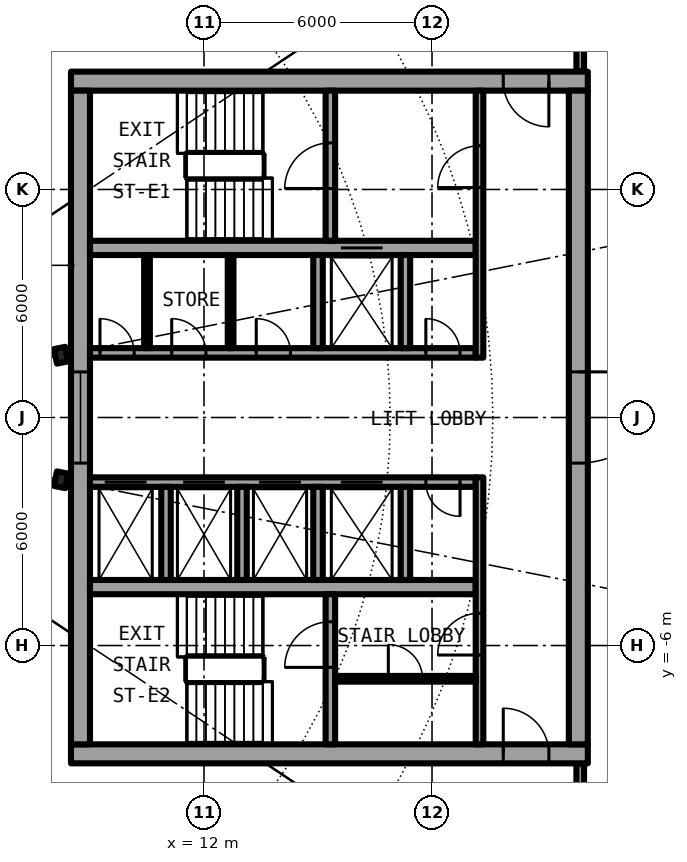
"""IFC4 building model, lengths in metres.
Left out: names, types, materials, properties, quantities, classifications, styles, units other than length and angle.
Written with IfcOpenShell. Run it as: python <this file> out.ifc"""

import sys

from ifc_helpers import new_model, si_unit, direction, frame, frame_2d, origin, origin_2d, place, context, subcontext, project, spatial, rectangle, i_section, extrude, element, fill, save


model = new_model("IFC4")
c1 = context("Model", 3, precision=1e-05, world=origin(), true_north=direction((0.0, 1.0)))
c2 = subcontext(c1, "Body", "Model", "MODEL_VIEW")
j1 = project(units=[si_unit("LENGTHUNIT", "METRE"), si_unit("PLANEANGLEUNIT", "RADIAN")], contexts=[c1])
p1 = place(None, origin())
s1 = spatial("IfcSite", under=j1, at=p1, CompositionType="ELEMENT")
p2 = place(p1, origin())
s2 = spatial("IfcBuilding", under=s1, at=p2, CompositionType="ELEMENT")
p3 = place(p2, frame((0.0, 0.0, 179.9)))
s3 = spatial("IfcBuildingStorey", under=s2, at=p3, CompositionType="ELEMENT", Elevation=179.9)
for number, where, z_axis, x_axis in (
    (1, (8.239, 1.639, 0.0), (0.0, 0.0, 1.0), (0.981, 0.195, 0.0)),
    (2, (8.239, -1.639, 0.0), (0.0, 0.0, 1.0), (0.981, -0.195, 0.0)),
):
    element("IfcColumn", number, at=place(p3, frame(where, z_axis=z_axis, x_axis=x_axis)), inside=s3, PredefinedType="COLUMN", context=c2, shape_type="SweptSolid", body=[
        extrude(i_section(OverallWidth=0.3, OverallDepth=0.39, WebThickness=0.011, FlangeThickness=0.019, FilletRadius=0.027, at=origin_2d()), origin(), (0.0, 0.0, 1.0), 6.1),
    ])
p4 = place(p3, frame((22.1, 8.85, 0.0), z_axis=(0.0, 0.0, 1.0), x_axis=(-1.0, 0.0, 0.0)))
e3 = element("IfcWall", 3, at=p4, inside=s3, PredefinedType="SHEAR", context=c2, shape_type="SweptSolid", body=[
    extrude(rectangle(XDim=13.6, YDim=0.5, at=frame_2d((6.8, 0.0))), origin(), (0.0, 0.0, 1.0), 6.1),
])
p5 = place(p4, frame((1.025, 0.0, 0.0)))
e4 = element("IfcOpeningElement", 4, at=p5, cuts=e3, PredefinedType="OPENING", context=c2, shape_type="SweptSolid", body=[
    extrude(rectangle(XDim=1.2, YDim=2.3, at=frame_2d((0.6, 1.15))), frame((0.0, 0.26, 0.0), z_axis=(0.0, -1.0, 0.0), x_axis=(1.0, 0.0, 0.0)), (0.0, 0.0, 1.0), 0.52),
])
p6 = place(p3, frame((8.5, -8.85, 0.0), z_axis=(0.0, 0.0, 1.0), x_axis=(1.0, 0.0, 0.0)))
e5 = element("IfcWall", 5, at=p6, inside=s3, PredefinedType="SHEAR", context=c2, shape_type="SweptSolid", body=[
    extrude(rectangle(XDim=13.6, YDim=0.5, at=frame_2d((6.8, 0.0))), origin(), (0.0, 0.0, 1.0), 6.1),
])
p7 = place(p6, frame((11.375, 0.0, 0.0)))
e6 = element("IfcOpeningElement", 6, at=p7, cuts=e5, PredefinedType="OPENING", context=c2, shape_type="SweptSolid", body=[
    extrude(rectangle(XDim=1.2, YDim=2.3, at=frame_2d((0.6, 1.15))), frame((0.0, 0.26, 0.0), z_axis=(0.0, -1.0, 0.0), x_axis=(1.0, 0.0, 0.0)), (0.0, 0.0, 1.0), 0.52),
])
p8 = place(p3, frame((21.85, 8.6, 0.0), z_axis=(0.0, 0.0, 1.0), x_axis=(0.0, -1.0, 0.0)))
e7 = element("IfcWall", 7, at=p8, inside=s3, PredefinedType="SHEAR", context=c2, shape_type="SweptSolid", body=[
    extrude(rectangle(XDim=17.2, YDim=0.5, at=frame_2d((8.6, 0.0))), origin(), (0.0, 0.0, 1.0), 6.1),
])
p9 = place(p8, frame((7.4, 0.0, 0.0)))
e8 = element("IfcOpeningElement", 8, at=p9, cuts=e7, PredefinedType="OPENING", context=c2, shape_type="SweptSolid", body=[
    extrude(rectangle(XDim=2.4, YDim=2.3, at=frame_2d((1.2, 1.15))), frame((0.0, 0.26, 0.0), z_axis=(0.0, -1.0, 0.0), x_axis=(1.0, 0.0, 0.0)), (0.0, 0.0, 1.0), 0.52),
])
p10 = place(p3, frame((8.75, -8.6, 0.0), z_axis=(0.0, 0.0, 1.0), x_axis=(0.0, 1.0, 0.0)))
e9 = element("IfcWall", 9, at=p10, inside=s3, PredefinedType="SHEAR", context=c2, shape_type="SweptSolid", body=[
    extrude(rectangle(XDim=17.2, YDim=0.5, at=frame_2d((8.6, 0.0))), origin(), (0.0, 0.0, 1.0), 6.1),
])
p11 = place(p10, frame((7.4, 0.0, 0.1)))
e10 = element("IfcOpeningElement", 10, at=p11, cuts=e9, PredefinedType="OPENING", context=c2, shape_type="SweptSolid", body=[
    extrude(rectangle(XDim=2.4, YDim=2.2, at=frame_2d((1.2, 1.1))), frame((0.0, 0.26, 0.0), z_axis=(0.0, -1.0, 0.0), x_axis=(1.0, 0.0, 0.0)), (0.0, 0.0, 1.0), 0.52),
])
p12 = place(p3, frame((9.0, 1.7, 0.0), z_axis=(0.0, 0.0, 1.0), x_axis=(1.0, 0.0, 0.0)))
e11 = element("IfcWall", 11, at=p12, inside=s3, PredefinedType="SHEAR", context=c2, shape_type="SweptSolid", body=[
    extrude(rectangle(XDim=10.15, YDim=0.25, at=frame_2d((5.075, 0.0))), origin(), (0.0, 0.0, 1.0), 6.1),
])
p13 = place(p12, frame((0.262, 0.0, 0.0)))
e12 = element("IfcOpeningElement", 12, at=p13, cuts=e11, PredefinedType="OPENING", context=c2, shape_type="SweptSolid", body=[
    extrude(rectangle(XDim=0.9, YDim=2.3, at=frame_2d((0.45, 1.15))), frame((0.0, 0.135, 0.0), z_axis=(0.0, -1.0, 0.0), x_axis=(1.0, 0.0, 0.0)), (0.0, 0.0, 1.0), 0.27),
])
p14 = place(p12, frame((2.15, 0.0, 0.0)))
e13 = element("IfcOpeningElement", 13, at=p14, cuts=e11, PredefinedType="OPENING", context=c2, shape_type="SweptSolid", body=[
    extrude(rectangle(XDim=0.9, YDim=2.3, at=frame_2d((0.45, 1.15))), frame((0.0, 0.135, 0.0), z_axis=(0.0, -1.0, 0.0), x_axis=(1.0, 0.0, 0.0)), (0.0, 0.0, 1.0), 0.27),
])
p15 = place(p12, frame((4.375, 0.0, 0.0)))
e14 = element("IfcOpeningElement", 14, at=p15, cuts=e11, PredefinedType="OPENING", context=c2, shape_type="SweptSolid", body=[
    extrude(rectangle(XDim=0.9, YDim=2.3, at=frame_2d((0.45, 1.15))), frame((0.0, 0.135, 0.0), z_axis=(0.0, -1.0, 0.0), x_axis=(1.0, 0.0, 0.0)), (0.0, 0.0, 1.0), 0.27),
])
p16 = place(p12, frame((8.837, 0.0, 0.0)))
e15 = element("IfcOpeningElement", 15, at=p16, cuts=e11, PredefinedType="OPENING", context=c2, shape_type="SweptSolid", body=[
    extrude(rectangle(XDim=0.9, YDim=2.3, at=frame_2d((0.45, 1.15))), frame((0.0, 0.135, 0.0), z_axis=(0.0, -1.0, 0.0), x_axis=(1.0, 0.0, 0.0)), (0.0, 0.0, 1.0), 0.27),
])
p17 = place(p3, frame((9.0, 4.462, 0.0), z_axis=(0.0, 0.0, 1.0), x_axis=(1.0, 0.0, 0.0)))
e16 = element("IfcWall", 16, at=p17, inside=s3, PredefinedType="SHEAR", context=c2, shape_type="SweptSolid", body=[
    extrude(rectangle(XDim=10.15, YDim=0.375, at=frame_2d((5.075, 0.0))), origin(), (0.0, 0.0, 1.0), 6.1),
])
p18 = place(p17, frame((6.6, 0.0, 0.0)))
e17 = element("IfcOpeningElement", 17, at=p18, cuts=e16, PredefinedType="OPENING", context=c2, shape_type="SweptSolid", body=[
    extrude(rectangle(XDim=1.1, YDim=2.3, at=frame_2d((0.55, 1.15))), frame((0.0, 0.198, 0.0), z_axis=(0.0, -1.0, 0.0), x_axis=(1.0, 0.0, 0.0)), (0.0, 0.0, 1.0), 0.395),
])
p19 = place(p3, frame((15.325, 4.65, 0.0), z_axis=(0.0, 0.0, 1.0), x_axis=(0.0, 1.0, 0.0)))
e18 = element("IfcWall", 18, at=p19, inside=s3, PredefinedType="SHEAR", context=c2, shape_type="SweptSolid", body=[
    extrude(rectangle(XDim=3.95, YDim=0.25, at=frame_2d((1.975, 0.0))), origin(), (0.0, 0.0, 1.0), 6.1),
])
p20 = place(p19, frame((1.375, 0.0, 0.0)))
e19 = element("IfcOpeningElement", 19, at=p20, cuts=e18, PredefinedType="OPENING", context=c2, shape_type="SweptSolid", body=[
    extrude(rectangle(XDim=1.2, YDim=2.3, at=frame_2d((0.6, 1.15))), frame((0.0, 0.135, 0.0), z_axis=(0.0, -1.0, 0.0), x_axis=(1.0, 0.0, 0.0)), (0.0, 0.0, 1.0), 0.27),
])
for number, where, z_axis, x_axis in (
    (20, (15.0, 1.825, 0.0), (0.0, 0.0, 1.0), (0.0, 1.0, 0.0)),
    (21, (17.3, 1.825, 0.0), (0.0, 0.0, 1.0), (0.0, 1.0, 0.0)),
):
    element("IfcWall", number, at=place(p3, frame(where, z_axis=z_axis, x_axis=x_axis)), inside=s3, PredefinedType="SOLIDWALL", context=c2, shape_type="SweptSolid", body=[
        extrude(rectangle(XDim=2.45, YDim=0.25, at=frame_2d((1.225, 0.0))), origin(), (0.0, 0.0, 1.0), 5.7),
    ])
p21 = place(p3, frame((19.25, 1.575, 0.0), z_axis=(0.0, 0.0, 1.0), x_axis=(0.0, 1.0, 0.0)))
e22 = element("IfcWall", 22, at=p21, inside=s3, PredefinedType="SOLIDWALL", context=c2, shape_type="SweptSolid", body=[
    extrude(rectangle(XDim=7.025, YDim=0.2, at=frame_2d((3.513, 0.0))), origin(), (0.0, 0.0, 1.0), 5.7),
])
p22 = place(p21, frame((4.475, 0.0, 0.0)))
e23 = element("IfcOpeningElement", 23, at=p22, cuts=e22, PredefinedType="OPENING", context=c2, shape_type="SweptSolid", body=[
    extrude(rectangle(XDim=1.1, YDim=2.3, at=frame_2d((0.55, 1.15))), frame((0.0, 0.11, 0.0), z_axis=(0.0, -1.0, 0.0), x_axis=(1.0, 0.0, 0.0)), (0.0, 0.0, 1.0), 0.22),
])
p23 = place(p3, frame((19.15, -1.7, 0.0), z_axis=(0.0, 0.0, 1.0), x_axis=(-1.0, 0.0, 0.0)))
e24 = element("IfcWall", 24, at=p23, inside=s3, PredefinedType="SHEAR", context=c2, shape_type="SweptSolid", body=[
    extrude(rectangle(XDim=10.15, YDim=0.25, at=frame_2d((5.075, 0.0))), origin(), (0.0, 0.0, 1.0), 6.1),
])
p24 = place(p23, frame((8.663, 0.0, 0.0)))
e25 = element("IfcOpeningElement", 25, at=p24, cuts=e24, PredefinedType="OPENING", context=c2, shape_type="SweptSolid", body=[
    extrude(rectangle(XDim=1.1, YDim=2.3, at=frame_2d((0.55, 1.15))), frame((0.0, 0.135, 0.0), z_axis=(0.0, -1.0, 0.0), x_axis=(1.0, 0.0, 0.0)), (0.0, 0.0, 1.0), 0.27),
])
p25 = place(p23, frame((6.6, 0.0, 0.0)))
e26 = element("IfcOpeningElement", 26, at=p25, cuts=e24, PredefinedType="OPENING", context=c2, shape_type="SweptSolid", body=[
    extrude(rectangle(XDim=1.1, YDim=2.3, at=frame_2d((0.55, 1.15))), frame((0.0, 0.135, 0.0), z_axis=(0.0, -1.0, 0.0), x_axis=(1.0, 0.0, 0.0)), (0.0, 0.0, 1.0), 0.27),
])
p26 = place(p23, frame((4.6, 0.0, 0.0)))
e27 = element("IfcOpeningElement", 27, at=p26, cuts=e24, PredefinedType="OPENING", context=c2, shape_type="SweptSolid", body=[
    extrude(rectangle(XDim=1.1, YDim=2.3, at=frame_2d((0.55, 1.15))), frame((0.0, 0.135, 0.0), z_axis=(0.0, -1.0, 0.0), x_axis=(1.0, 0.0, 0.0)), (0.0, 0.0, 1.0), 0.27),
])
p27 = place(p23, frame((2.45, 0.0, 0.0)))
e28 = element("IfcOpeningElement", 28, at=p27, cuts=e24, PredefinedType="OPENING", context=c2, shape_type="SweptSolid", body=[
    extrude(rectangle(XDim=1.1, YDim=2.3, at=frame_2d((0.55, 1.15))), frame((0.0, 0.135, 0.0), z_axis=(0.0, -1.0, 0.0), x_axis=(1.0, 0.0, 0.0)), (0.0, 0.0, 1.0), 0.27),
])
p28 = place(p23, frame((0.413, 0.0, 0.0)))
e29 = element("IfcOpeningElement", 29, at=p28, cuts=e24, PredefinedType="OPENING", context=c2, shape_type="SweptSolid", body=[
    extrude(rectangle(XDim=0.9, YDim=2.3, at=frame_2d((0.45, 1.15))), frame((0.0, 0.135, 0.0), z_axis=(0.0, -1.0, 0.0), x_axis=(1.0, 0.0, 0.0)), (0.0, 0.0, 1.0), 0.27),
])
p29 = place(p3, frame((9.0, -4.462, 0.0), z_axis=(0.0, 0.0, 1.0), x_axis=(1.0, 0.0, 0.0)))
e30 = element("IfcWall", 30, at=p29, inside=s3, PredefinedType="SHEAR", context=c2, shape_type="SweptSolid", body=[
    extrude(rectangle(XDim=10.15, YDim=0.375, at=frame_2d((5.075, 0.0))), origin(), (0.0, 0.0, 1.0), 6.1),
])
p30 = place(p3, frame((15.325, -8.6, 0.0), z_axis=(0.0, 0.0, 1.0), x_axis=(0.0, 1.0, 0.0)))
e31 = element("IfcWall", 31, at=p30, inside=s3, PredefinedType="SHEAR", context=c2, shape_type="SweptSolid", body=[
    extrude(rectangle(XDim=3.95, YDim=0.25, at=frame_2d((1.975, 0.0))), origin(), (0.0, 0.0, 1.0), 6.1),
])
p31 = place(p30, frame((2.025, 0.0, 0.0)))
e32 = element("IfcOpeningElement", 32, at=p31, cuts=e31, PredefinedType="OPENING", context=c2, shape_type="SweptSolid", body=[
    extrude(rectangle(XDim=1.2, YDim=2.3, at=frame_2d((0.6, 1.15))), frame((0.0, 0.135, 0.0), z_axis=(0.0, -1.0, 0.0), x_axis=(1.0, 0.0, 0.0)), (0.0, 0.0, 1.0), 0.27),
])
for number, where, z_axis, x_axis in (
    (33, (15.0, -1.825, 0.0), (0.0, 0.0, 1.0), (0.0, -1.0, 0.0)),
    (34, (17.3, -1.825, 0.0), (0.0, 0.0, 1.0), (0.0, -1.0, 0.0)),
):
    element("IfcWall", number, at=place(p3, frame(where, z_axis=z_axis, x_axis=x_axis)), inside=s3, PredefinedType="SOLIDWALL", context=c2, shape_type="SweptSolid", body=[
        extrude(rectangle(XDim=2.45, YDim=0.25, at=frame_2d((1.225, 0.0))), origin(), (0.0, 0.0, 1.0), 5.7),
    ])
p32 = place(p3, frame((19.25, -8.6, 0.0), z_axis=(0.0, 0.0, 1.0), x_axis=(0.0, 1.0, 0.0)))
e35 = element("IfcWall", 35, at=p32, inside=s3, PredefinedType="SOLIDWALL", context=c2, shape_type="SweptSolid", body=[
    extrude(rectangle(XDim=7.025, YDim=0.2, at=frame_2d((3.513, 0.0))), origin(), (0.0, 0.0, 1.0), 5.7),
])
p33 = place(p32, frame((2.35, 0.0, 0.0)))
e36 = element("IfcOpeningElement", 36, at=p33, cuts=e35, PredefinedType="OPENING", context=c2, shape_type="SweptSolid", body=[
    extrude(rectangle(XDim=1.1, YDim=2.3, at=frame_2d((0.55, 1.15))), frame((0.0, 0.11, 0.0), z_axis=(0.0, -1.0, 0.0), x_axis=(1.0, 0.0, 0.0)), (0.0, 0.0, 1.0), 0.22),
])
for number, where, z_axis, x_axis in (
    (37, (11.0, -1.825, 0.0), (0.0, 0.0, 1.0), (0.0, -1.0, 0.0)),
    (38, (13.0, -1.825, 0.0), (0.0, 0.0, 1.0), (0.0, -1.0, 0.0)),
):
    element("IfcWall", number, at=place(p3, frame(where, z_axis=z_axis, x_axis=x_axis)), inside=s3, PredefinedType="SOLIDWALL", context=c2, shape_type="SweptSolid", body=[
        extrude(rectangle(XDim=2.45, YDim=0.25, at=frame_2d((1.225, 0.0))), origin(), (0.0, 0.0, 1.0), 5.7),
    ])
for number, where, z_axis, x_axis in (
    (39, (10.5, 1.825, 0.0), (0.0, 0.0, 1.0), (0.0, 1.0, 0.0)),
    (40, (12.7, 1.825, 0.0), (0.0, 0.0, 1.0), (0.0, 1.0, 0.0)),
):
    element("IfcWall", number, at=place(p3, frame(where, z_axis=z_axis, x_axis=x_axis)), inside=s3, PredefinedType="PARTITIONING", context=c2, shape_type="SweptSolid", body=[
        extrude(rectangle(XDim=2.45, YDim=0.15, at=frame_2d((1.225, 0.0))), origin(), (0.0, 0.0, 1.0), 5.7),
    ])
p34 = place(p3, frame((15.45, -6.875, 0.0), z_axis=(0.0, 0.0, 1.0), x_axis=(1.0, 0.0, 0.0)))
e41 = element("IfcWall", 41, at=p34, inside=s3, PredefinedType="PARTITIONING", context=c2, shape_type="SweptSolid", body=[
    extrude(rectangle(XDim=3.7, YDim=0.15, at=frame_2d((1.85, 0.0))), origin(), (0.0, 0.0, 1.0), 5.7),
])
p35 = place(p34, frame((1.4, 0.0, 0.0)))
e42 = element("IfcOpeningElement", 42, at=p35, cuts=e41, PredefinedType="OPENING", context=c2, shape_type="SweptSolid", body=[
    extrude(rectangle(XDim=0.9, YDim=2.3, at=frame_2d((0.45, 1.15))), frame((0.0, 0.085, 0.0), z_axis=(0.0, -1.0, 0.0), x_axis=(1.0, 0.0, 0.0)), (0.0, 0.0, 1.0), 0.17),
])
for number, where, z_axis, x_axis in (
    (43, (21.9, -12.52, 0.0), (0.0, 0.0, 1.0), (0.0, 1.0, 0.0)),
    (44, (21.9, 9.12, 0.0), (0.0, 0.0, 1.0), (0.0, 1.0, 0.0)),
):
    element("IfcWall", number, at=place(p3, frame(where, z_axis=z_axis, x_axis=x_axis)), inside=s3, PredefinedType="PARTITIONING", context=c2, shape_type="SweptSolid", body=[
        extrude(rectangle(XDim=3.4, YDim=0.2, at=frame_2d((1.7, 0.0))), origin(), (0.0, 0.0, 1.0), 5.7),
    ])
p36 = place(p3, frame((3.758, -9.072, 0.0), z_axis=(0.0, 0.0, 1.0), x_axis=(0.38265514428, -0.923891249312, 0.0)))
e45 = element("IfcWall", 45, at=p36, inside=s3, PredefinedType="PARTITIONING", context=c2, shape_type="SweptSolid", body=[
    extrude(rectangle(XDim=17.438, YDim=0.15, at=frame_2d((8.719, 0.0))), origin(), (0.0, 0.0, 1.0), 5.7),
])
p37 = place(p18, origin())
e46 = element("IfcDoor", 46, at=p37, inside=s3, OperationType="DOUBLE_DOOR_SLIDING", PredefinedType="DOOR", context=c2, shape_type="SweptSolid", body=[
    extrude(rectangle(XDim=1.1, YDim=2.3, at=frame_2d((0.55, 1.15))), frame((0.0, 0.025, 0.0), z_axis=(0.0, -1.0, 0.0), x_axis=(1.0, 0.0, 0.0)), (0.0, 0.0, 1.0), 0.05),
])
fill(e17, e46)
p38 = place(p24, origin())
e47 = element("IfcDoor", 47, at=p38, inside=s3, OperationType="DOUBLE_DOOR_SLIDING", PredefinedType="DOOR", context=c2, shape_type="SweptSolid", body=[
    extrude(rectangle(XDim=1.1, YDim=2.3, at=frame_2d((0.55, 1.15))), frame((0.0, 0.025, 0.0), z_axis=(0.0, -1.0, 0.0), x_axis=(1.0, 0.0, 0.0)), (0.0, 0.0, 1.0), 0.05),
])
fill(e25, e47)
p39 = place(p25, origin())
e48 = element("IfcDoor", 48, at=p39, inside=s3, OperationType="DOUBLE_DOOR_SLIDING", PredefinedType="DOOR", context=c2, shape_type="SweptSolid", body=[
    extrude(rectangle(XDim=1.1, YDim=2.3, at=frame_2d((0.55, 1.15))), frame((0.0, 0.025, 0.0), z_axis=(0.0, -1.0, 0.0), x_axis=(1.0, 0.0, 0.0)), (0.0, 0.0, 1.0), 0.05),
])
fill(e26, e48)
p40 = place(p26, origin())
e49 = element("IfcDoor", 49, at=p40, inside=s3, OperationType="DOUBLE_DOOR_SLIDING", PredefinedType="DOOR", context=c2, shape_type="SweptSolid", body=[
    extrude(rectangle(XDim=1.1, YDim=2.3, at=frame_2d((0.55, 1.15))), frame((0.0, 0.025, 0.0), z_axis=(0.0, -1.0, 0.0), x_axis=(1.0, 0.0, 0.0)), (0.0, 0.0, 1.0), 0.05),
])
fill(e27, e49)
p41 = place(p27, origin())
e50 = element("IfcDoor", 50, at=p41, inside=s3, OperationType="DOUBLE_DOOR_SLIDING", PredefinedType="DOOR", context=c2, shape_type="SweptSolid", body=[
    extrude(rectangle(XDim=1.1, YDim=2.3, at=frame_2d((0.55, 1.15))), frame((0.0, 0.025, 0.0), z_axis=(0.0, -1.0, 0.0), x_axis=(1.0, 0.0, 0.0)), (0.0, 0.0, 1.0), 0.05),
])
fill(e28, e50)
p42 = place(p13, origin())
e51 = element("IfcDoor", 51, at=p42, inside=s3, OperationType="SINGLE_SWING_RIGHT", PredefinedType="DOOR", context=c2, shape_type="SweptSolid", body=[
    extrude(rectangle(XDim=0.9, YDim=2.3, at=frame_2d((0.45, 1.15))), frame((0.0, 0.025, 0.0), z_axis=(0.0, -1.0, 0.0), x_axis=(1.0, 0.0, 0.0)), (0.0, 0.0, 1.0), 0.05),
])
fill(e12, e51)
p43 = place(p14, origin())
e52 = element("IfcDoor", 52, at=p43, inside=s3, OperationType="SINGLE_SWING_RIGHT", PredefinedType="DOOR", context=c2, shape_type="SweptSolid", body=[
    extrude(rectangle(XDim=0.9, YDim=2.3, at=frame_2d((0.45, 1.15))), frame((0.0, 0.025, 0.0), z_axis=(0.0, -1.0, 0.0), x_axis=(1.0, 0.0, 0.0)), (0.0, 0.0, 1.0), 0.05),
])
fill(e13, e52)
p44 = place(p15, origin())
e53 = element("IfcDoor", 53, at=p44, inside=s3, OperationType="SINGLE_SWING_RIGHT", PredefinedType="DOOR", context=c2, shape_type="SweptSolid", body=[
    extrude(rectangle(XDim=0.9, YDim=2.3, at=frame_2d((0.45, 1.15))), frame((0.0, 0.025, 0.0), z_axis=(0.0, -1.0, 0.0), x_axis=(1.0, 0.0, 0.0)), (0.0, 0.0, 1.0), 0.05),
])
fill(e14, e53)
p45 = place(p16, origin())
e54 = element("IfcDoor", 54, at=p45, inside=s3, OperationType="SINGLE_SWING_LEFT", PredefinedType="DOOR", context=c2, shape_type="SweptSolid", body=[
    extrude(rectangle(XDim=0.9, YDim=2.3, at=frame_2d((0.45, 1.15))), frame((0.0, 0.025, 0.0), z_axis=(0.0, -1.0, 0.0), x_axis=(1.0, 0.0, 0.0)), (0.0, 0.0, 1.0), 0.05),
])
fill(e15, e54)
p46 = place(p28, origin())
e55 = element("IfcDoor", 55, at=p46, inside=s3, OperationType="SINGLE_SWING_RIGHT", PredefinedType="DOOR", context=c2, shape_type="SweptSolid", body=[
    extrude(rectangle(XDim=0.9, YDim=2.3, at=frame_2d((0.45, 1.15))), frame((0.0, 0.025, 0.0), z_axis=(0.0, -1.0, 0.0), x_axis=(1.0, 0.0, 0.0)), (0.0, 0.0, 1.0), 0.05),
])
fill(e29, e55)
p47 = place(p35, origin())
e56 = element("IfcDoor", 56, at=p47, inside=s3, OperationType="SINGLE_SWING_LEFT", PredefinedType="DOOR", context=c2, shape_type="SweptSolid", body=[
    extrude(rectangle(XDim=0.9, YDim=2.3, at=frame_2d((0.45, 1.15))), frame((0.0, 0.025, 0.0), z_axis=(0.0, -1.0, 0.0), x_axis=(1.0, 0.0, 0.0)), (0.0, 0.0, 1.0), 0.05),
])
fill(e42, e56)
p48 = place(p20, origin())
e57 = element("IfcDoor", 57, at=p48, inside=s3, OperationType="SINGLE_SWING_LEFT", PredefinedType="DOOR", context=c2, shape_type="SweptSolid", body=[
    extrude(rectangle(XDim=1.2, YDim=2.3, at=frame_2d((0.6, 1.15))), frame((0.0, 0.025, 0.0), z_axis=(0.0, -1.0, 0.0), x_axis=(1.0, 0.0, 0.0)), (0.0, 0.0, 1.0), 0.05),
])
fill(e19, e57)
p49 = place(p31, origin())
e58 = element("IfcDoor", 58, at=p49, inside=s3, OperationType="SINGLE_SWING_LEFT", PredefinedType="DOOR", context=c2, shape_type="SweptSolid", body=[
    extrude(rectangle(XDim=1.2, YDim=2.3, at=frame_2d((0.6, 1.15))), frame((0.0, 0.025, 0.0), z_axis=(0.0, -1.0, 0.0), x_axis=(1.0, 0.0, 0.0)), (0.0, 0.0, 1.0), 0.05),
])
fill(e32, e58)
p50 = place(p22, origin())
e59 = element("IfcDoor", 59, at=p50, inside=s3, OperationType="SINGLE_SWING_LEFT", PredefinedType="DOOR", context=c2, shape_type="SweptSolid", body=[
    extrude(rectangle(XDim=1.1, YDim=2.3, at=frame_2d((0.55, 1.15))), frame((0.0, 0.025, 0.0), z_axis=(0.0, -1.0, 0.0), x_axis=(1.0, 0.0, 0.0)), (0.0, 0.0, 1.0), 0.05),
])
fill(e23, e59)
p51 = place(p33, origin())
e60 = element("IfcDoor", 60, at=p51, inside=s3, OperationType="SINGLE_SWING_RIGHT", PredefinedType="DOOR", context=c2, shape_type="SweptSolid", body=[
    extrude(rectangle(XDim=1.1, YDim=2.3, at=frame_2d((0.55, 1.15))), frame((0.0, 0.025, 0.0), z_axis=(0.0, -1.0, 0.0), x_axis=(1.0, 0.0, 0.0)), (0.0, 0.0, 1.0), 0.05),
])
fill(e36, e60)
p52 = place(p5, origin())
e61 = element("IfcDoor", 61, at=p52, inside=s3, OperationType="SINGLE_SWING_RIGHT", PredefinedType="DOOR", context=c2, shape_type="SweptSolid", body=[
    extrude(rectangle(XDim=1.2, YDim=2.3, at=frame_2d((0.6, 1.15))), frame((0.0, 0.025, 0.0), z_axis=(0.0, -1.0, 0.0), x_axis=(1.0, 0.0, 0.0)), (0.0, 0.0, 1.0), 0.05),
])
fill(e4, e61)
p53 = place(p7, origin())
e62 = element("IfcDoor", 62, at=p53, inside=s3, OperationType="SINGLE_SWING_LEFT", PredefinedType="DOOR", context=c2, shape_type="SweptSolid", body=[
    extrude(rectangle(XDim=1.2, YDim=2.3, at=frame_2d((0.6, 1.15))), frame((0.0, 0.025, 0.0), z_axis=(0.0, -1.0, 0.0), x_axis=(1.0, 0.0, 0.0)), (0.0, 0.0, 1.0), 0.05),
])
fill(e6, e62)
p54 = place(p9, origin())
e63 = element("IfcDoor", 63, at=p54, inside=s3, OperationType="SINGLE_SWING_LEFT", PredefinedType="DOOR", context=c2, shape_type="SweptSolid", body=[
    extrude(rectangle(XDim=2.4, YDim=2.3, at=frame_2d((1.2, 1.15))), frame((0.0, 0.025, 0.0), z_axis=(0.0, -1.0, 0.0), x_axis=(1.0, 0.0, 0.0)), (0.0, 0.0, 1.0), 0.05),
])
fill(e8, e63)
p55 = place(p11, origin())
e64 = element("IfcWindow", 64, at=p55, inside=s3, PartitioningType="SINGLE_PANEL", PredefinedType="WINDOW", context=c2, shape_type="SweptSolid", body=[
    extrude(rectangle(XDim=2.4, YDim=2.2, at=frame_2d((1.2, 1.1))), frame((0.0, 0.03, 0.0), z_axis=(0.0, -1.0, 0.0), x_axis=(1.0, 0.0, 0.0)), (0.0, 0.0, 1.0), 0.06),
])
fill(e10, e64)
save(model, sys.argv[1])
